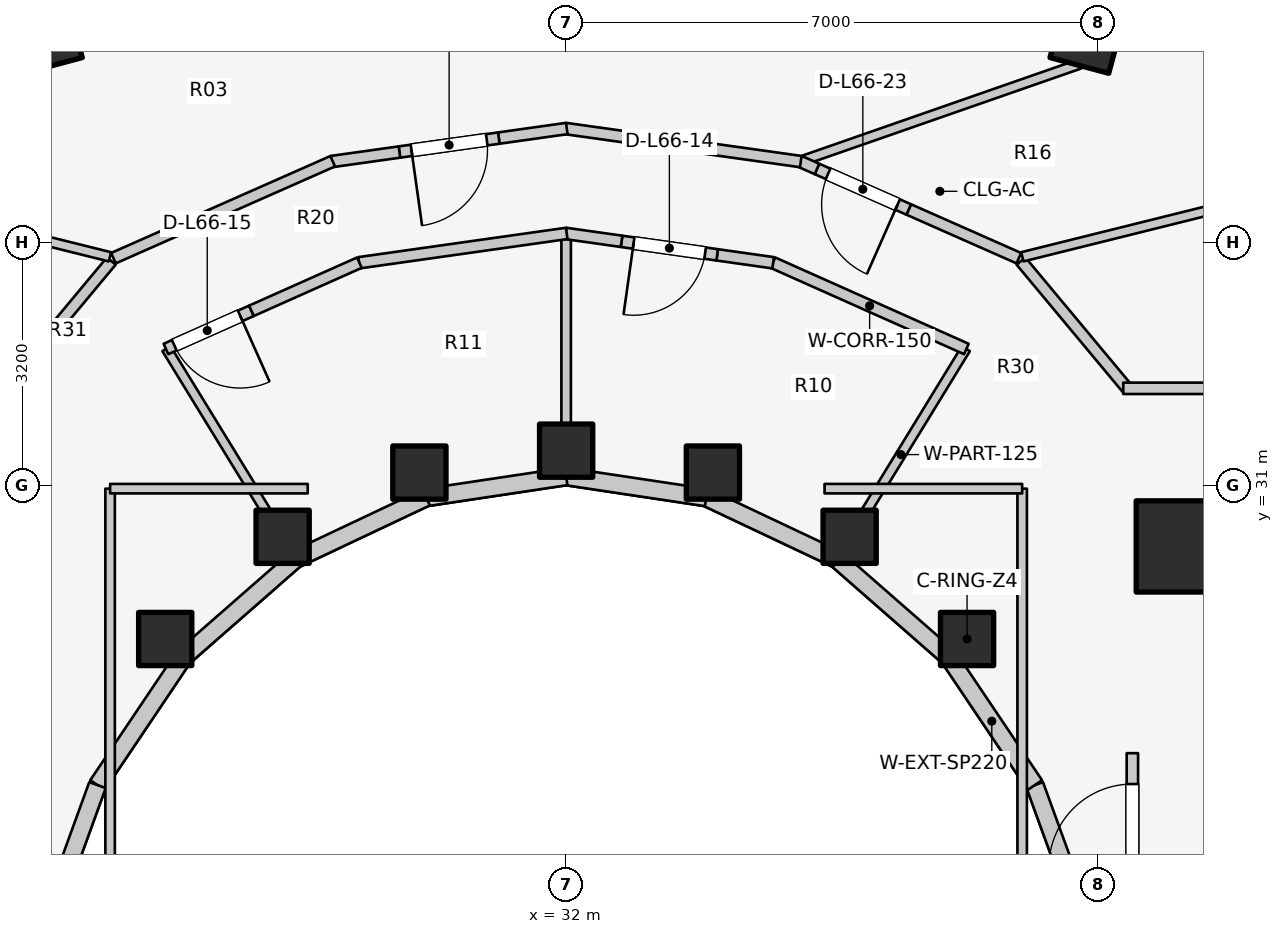
"""IFC4 building model, lengths in metres.
Left out: names, types, materials, properties, quantities, classifications, styles, units other than length and angle.
Written with IfcOpenShell. Run it as: python <this file> out.ifc"""

import sys

from ifc_helpers import new_model, si_unit, direction, frame, frame_2d, origin, origin_2d, place, context, subcontext, project, spatial, rectangle, extrude, element, fill, save


model = new_model("IFC4")
c1 = context("Model", 3, precision=1e-05, world=origin(), true_north=direction((0.0, 1.0)))
c2 = subcontext(c1, "Body", "Model", "MODEL_VIEW")
j1 = project(units=[si_unit("LENGTHUNIT", "METRE"), si_unit("PLANEANGLEUNIT", "RADIAN")], contexts=[c1])
p1 = place(None, origin())
s1 = spatial("IfcSite", under=j1, at=p1, CompositionType="ELEMENT")
p2 = place(p1, origin())
s2 = spatial("IfcBuilding", under=s1, at=p2, CompositionType="ELEMENT")
p3 = place(p2, frame((0.0, 0.0, 217.1)))
s3 = spatial("IfcBuildingStorey", under=s2, at=p3, CompositionType="ELEMENT", Elevation=217.1)
p4 = place(p3, frame((39.85, 30.35, 0.0), z_axis=(0.0, 0.0, 1.0), x_axis=(1.0, 0.0, 0.0)))
e1 = element("IfcWall", 1, at=p4, inside=s3, PredefinedType="SHEAR", context=c2, shape_type="SweptSolid", body=[
    extrude(rectangle(XDim=4.5, YDim=0.55, at=frame_2d((2.25, 0.0))), origin(), (0.0, 0.0, 1.0), 3.1),
])
p5 = place(p3, frame((40.1, 30.2, 0.0), z_axis=(0.0, 0.0, 1.0), x_axis=(1.0, 0.0, 0.0)))
e2 = element("IfcColumn", 2, at=p5, inside=s3, PredefinedType="COLUMN", context=c2, shape_type="SweptSolid", body=[
    extrude(rectangle(XDim=1.2, YDim=1.2, at=origin_2d()), origin(), (0.0, 0.0, 1.0), 3.1),
])
for number, where, z_axis, x_axis in (
    (3, (37.275, 28.982, 0.0), (0.0, 0.0, 1.0), (1.0, 0.0, 0.0)),
    (4, (35.73, 30.327, 0.0), (0.0, 0.0, 1.0), (1.0, 0.0, 0.0)),
    (5, (33.931, 31.172, 0.0), (0.0, 0.0, 1.0), (1.0, 0.0, 0.0)),
):
    element("IfcColumn", number, at=place(p3, frame(where, z_axis=z_axis, x_axis=x_axis)), inside=s3, PredefinedType="COLUMN", context=c2, shape_type="SweptSolid", body=[
        extrude(rectangle(XDim=0.7, YDim=0.7, at=origin_2d()), origin(), (0.0, 0.0, 1.0), 3.1),
    ])
p6 = place(p3, frame((38.856, 36.914, 0.0), z_axis=(0.0, 0.0, 1.0), x_axis=(0.258819045103, 0.965925826289, 0.0)))
e6 = element("IfcColumn", 6, at=p6, inside=s3, PredefinedType="COLUMN", context=c2, shape_type="SweptSolid", body=[
    extrude(rectangle(XDim=0.8, YDim=0.8, at=origin_2d()), origin(), (0.0, 0.0, 1.0), 3.1),
])
for number, where, z_axis, x_axis in (
    (7, (32.0, 31.46, 0.0), (0.0, 0.0, 1.0), (1.0, 0.0, 0.0)),
    (8, (30.069, 31.172, 0.0), (0.0, 0.0, 1.0), (1.0, 0.0, 0.0)),
):
    element("IfcColumn", number, at=place(p3, frame(where, z_axis=z_axis, x_axis=x_axis)), inside=s3, PredefinedType="COLUMN", context=c2, shape_type="SweptSolid", body=[
        extrude(rectangle(XDim=0.7, YDim=0.7, at=origin_2d()), origin(), (0.0, 0.0, 1.0), 3.1),
    ])
p7 = place(p3, frame((25.144, 36.914, 0.0), z_axis=(0.0, 0.0, 1.0), x_axis=(-0.258819045103, 0.965925826289, 0.0)))
e9 = element("IfcColumn", 9, at=p7, inside=s3, PredefinedType="COLUMN", context=c2, shape_type="SweptSolid", body=[
    extrude(rectangle(XDim=0.8, YDim=0.8, at=origin_2d()), origin(), (0.0, 0.0, 1.0), 3.1),
])
for number, where, z_axis, x_axis in (
    (10, (28.27, 30.327, 0.0), (0.0, 0.0, 1.0), (1.0, 0.0, 0.0)),
    (11, (26.725, 28.982, 0.0), (0.0, 0.0, 1.0), (1.0, 0.0, 0.0)),
):
    element("IfcColumn", number, at=place(p3, frame(where, z_axis=z_axis, x_axis=x_axis)), inside=s3, PredefinedType="COLUMN", context=c2, shape_type="SweptSolid", body=[
        extrude(rectangle(XDim=0.7, YDim=0.7, at=origin_2d()), origin(), (0.0, 0.0, 1.0), 3.1),
    ])
p8 = place(p3, frame((38.877, 25.102, 0.0), z_axis=(0.0, 0.0, 1.0), x_axis=(-0.341423187295, 0.93990968033, 0.0)))
e12 = element("IfcWall", 12, at=p8, inside=s3, PredefinedType="STANDARD", context=c2, shape_type="SweptSolid", body=[
    extrude(rectangle(XDim=2.084, YDim=0.23, at=frame_2d((1.042, 0.0))), origin(), (0.0, 0.0, 1.0), 2.56),
])
p9 = place(p3, frame((38.166, 27.06, 0.0), z_axis=(0.0, 0.0, 1.0), x_axis=(-0.558197800898, 0.829707909492, 0.0)))
e13 = element("IfcWall", 13, at=p9, inside=s3, PredefinedType="STANDARD", context=c2, shape_type="SweptSolid", body=[
    extrude(rectangle(XDim=2.027, YDim=0.23, at=frame_2d((1.013, 0.0))), origin(), (0.0, 0.0, 1.0), 1.22),
])
p10 = place(p3, frame((37.035, 28.742, 0.0), z_axis=(0.0, 0.0, 1.0), x_axis=(-0.752576694707, 0.658504607869, 0.0)))
e14 = element("IfcWall", 14, at=p10, inside=s3, PredefinedType="STANDARD", context=c2, shape_type="SweptSolid", body=[
    extrude(rectangle(XDim=1.959, YDim=0.23, at=frame_2d((0.98, 0.0))), origin(), (0.0, 0.0, 1.0), 1.22),
])
p11 = place(p3, frame((35.56, 30.032, 0.0), z_axis=(0.0, 0.0, 1.0), x_axis=(-0.904179699603, 0.427152280606, 0.0)))
e15 = element("IfcWall", 15, at=p11, inside=s3, PredefinedType="STANDARD", context=c2, shape_type="SweptSolid", body=[
    extrude(rectangle(XDim=1.899, YDim=0.23, at=frame_2d((0.95, 0.0))), origin(), (0.0, 0.0, 1.0), 1.22),
])
for number, where, z_axis, x_axis in (
    (16, (33.843, 30.843, 0.0), (0.0, 0.0, 1.0), (-0.989, 0.149, 0.0)),
    (17, (32.0, 31.12, 0.0), (0.0, 0.0, 1.0), (-0.989, -0.149, 0.0)),
):
    element("IfcWall", number, at=place(p3, frame(where, z_axis=z_axis, x_axis=x_axis)), inside=s3, PredefinedType="STANDARD", context=c2, shape_type="SweptSolid", body=[
        extrude(rectangle(XDim=1.864, YDim=0.23, at=frame_2d((0.932, 0.0))), origin(), (0.0, 0.0, 1.0), 1.22),
    ])
p12 = place(p3, frame((30.157, 30.843, 0.0), z_axis=(0.0, 0.0, 1.0), x_axis=(-0.904179699603, -0.427152280606, 0.0)))
e18 = element("IfcWall", 18, at=p12, inside=s3, PredefinedType="STANDARD", context=c2, shape_type="SweptSolid", body=[
    extrude(rectangle(XDim=1.899, YDim=0.23, at=frame_2d((0.95, 0.0))), origin(), (0.0, 0.0, 1.0), 1.22),
])
p13 = place(p3, frame((28.44, 30.032, 0.0), z_axis=(0.0, 0.0, 1.0), x_axis=(-0.752576694707, -0.658504607869, 0.0)))
e19 = element("IfcWall", 19, at=p13, inside=s3, PredefinedType="STANDARD", context=c2, shape_type="SweptSolid", body=[
    extrude(rectangle(XDim=1.959, YDim=0.23, at=frame_2d((0.98, 0.0))), origin(), (0.0, 0.0, 1.0), 1.22),
])
p14 = place(p3, frame((26.965, 28.742, 0.0), z_axis=(0.0, 0.0, 1.0), x_axis=(-0.558197800898, -0.829707909492, 0.0)))
e20 = element("IfcWall", 20, at=p14, inside=s3, PredefinedType="STANDARD", context=c2, shape_type="SweptSolid", body=[
    extrude(rectangle(XDim=2.027, YDim=0.23, at=frame_2d((1.013, 0.0))), origin(), (0.0, 0.0, 1.0), 1.22),
])
p15 = place(p3, frame((25.834, 27.06, 0.0), z_axis=(0.0, 0.0, 1.0), x_axis=(-0.341423187295, -0.93990968033, 0.0)))
e21 = element("IfcWall", 21, at=p15, inside=s3, PredefinedType="STANDARD", context=c2, shape_type="SweptSolid", body=[
    extrude(rectangle(XDim=2.084, YDim=0.23, at=frame_2d((1.042, 0.0))), origin(), (0.0, 0.0, 1.0), 2.56),
])
p16 = place(p3, frame((39.45, 24.08, 0.0), z_axis=(0.0, 0.0, 1.0), x_axis=(0.0, 1.0, 0.0)))
e22 = element("IfcWall", 22, at=p16, inside=s3, PredefinedType="PARTITIONING", context=c2, shape_type="SweptSolid", body=[
    extrude(rectangle(XDim=3.4, YDim=0.15, at=frame_2d((1.7, 0.0))), origin(), (0.0, 0.0, 1.0), 2.575),
])
p17 = place(p16, frame((1.894, 0.0, 0.0)))
e23 = element("IfcOpeningElement", 23, at=p17, cuts=e22, PredefinedType="OPENING", context=c2, shape_type="SweptSolid", body=[
    extrude(rectangle(XDim=1.1, YDim=2.1, at=frame_2d((0.55, 1.05))), frame((0.0, 0.085, 0.0), z_axis=(0.0, -1.0, 0.0), x_axis=(1.0, 0.0, 0.0)), (0.0, 0.0, 1.0), 0.17),
])
p18 = place(p3, frame((35.55, 30.015, 0.0), z_axis=(0.0, 0.0, 1.0), x_axis=(0.522763432117, 0.852477796802, 0.0)))
e24 = element("IfcWall", 24, at=p18, inside=s3, PredefinedType="PARTITIONING", context=c2, shape_type="SweptSolid", body=[
    extrude(rectangle(XDim=3.269, YDim=0.125, at=frame_2d((1.635, 0.0))), origin(), (0.0, 0.0, 1.0), 1.22),
])
p19 = place(p3, frame((32.0, 31.1, 0.0), z_axis=(0.0, 0.0, 1.0), x_axis=(0.0, 1.0, 0.0)))
e25 = element("IfcWall", 25, at=p19, inside=s3, PredefinedType="PARTITIONING", context=c2, shape_type="SweptSolid", body=[
    extrude(rectangle(XDim=3.218, YDim=0.125, at=frame_2d((1.609, 0.0))), origin(), (0.0, 0.0, 1.0), 1.22),
])
p20 = place(p3, frame((28.45, 30.015, 0.0), z_axis=(0.0, 0.0, 1.0), x_axis=(-0.522763432117, 0.852477796802, 0.0)))
e26 = element("IfcWall", 26, at=p20, inside=s3, PredefinedType="PARTITIONING", context=c2, shape_type="SweptSolid", body=[
    extrude(rectangle(XDim=3.269, YDim=0.125, at=frame_2d((1.635, 0.0))), origin(), (0.0, 0.0, 1.0), 1.22),
])
p21 = place(p3, frame((37.265, 32.798, 0.0), z_axis=(0.0, 0.0, 1.0), x_axis=(-0.913254317828, 0.407389924971, 0.0)))
e27 = element("IfcWall", 27, at=p21, inside=s3, PredefinedType="PARTITIONING", context=c2, shape_type="SweptSolid", body=[
    extrude(rectangle(XDim=2.787, YDim=0.15, at=frame_2d((1.393, 0.0))), origin(), (0.0, 0.0, 1.0), 1.22),
])
p22 = place(p3, frame((34.724, 33.932, 0.0), z_axis=(0.0, 0.0, 1.0), x_axis=(-0.990190745647, 0.13972217875, 0.0)))
e28 = element("IfcWall", 28, at=p22, inside=s3, PredefinedType="PARTITIONING", context=c2, shape_type="SweptSolid", body=[
    extrude(rectangle(XDim=0.744, YDim=0.15, at=frame_2d((0.372, 0.0))), origin(), (0.0, 0.0, 1.0), 2.105),
])
p23 = place(p3, frame((33.987, 34.036, 0.0), z_axis=(0.0, 0.0, 1.0), x_axis=(-0.990133183593, 0.140129507055, 0.0)))
e29 = element("IfcWall", 29, at=p23, inside=s3, PredefinedType="PARTITIONING", context=c2, shape_type="SweptSolid", body=[
    extrude(rectangle(XDim=1.27, YDim=0.15, at=frame_2d((0.635, 0.0))), origin(), (0.0, 0.0, 1.0), 2.16),
])
p24 = place(p23, frame((0.16, 0.0, 0.0)))
e30 = element("IfcOpeningElement", 30, at=p24, cuts=e29, PredefinedType="OPENING", context=c2, shape_type="SweptSolid", body=[
    extrude(rectangle(XDim=0.95, YDim=2.1, at=frame_2d((0.475, 1.05))), frame((0.0, 0.085, 0.0), z_axis=(0.0, -1.0, 0.0), x_axis=(1.0, 0.0, 0.0)), (0.0, 0.0, 1.0), 0.17),
])
p25 = place(p3, frame((32.729, 34.214, 0.0), z_axis=(0.0, 0.0, 1.0), x_axis=(-0.990138882688, 0.140089232242, 0.0)))
e31 = element("IfcWall", 31, at=p25, inside=s3, PredefinedType="PARTITIONING", context=c2, shape_type="SweptSolid", body=[
    extrude(rectangle(XDim=0.744, YDim=0.15, at=frame_2d((0.372, 0.0))), origin(), (0.0, 0.0, 1.0), 1.22),
])
p26 = place(p3, frame((32.007, 34.318, 0.0), z_axis=(0.0, 0.0, 1.0), x_axis=(-0.990150268487, -0.140008734782, 0.0)))
e32 = element("IfcWall", 32, at=p26, inside=s3, PredefinedType="PARTITIONING", context=c2, shape_type="SweptSolid", body=[
    extrude(rectangle(XDim=2.759, YDim=0.15, at=frame_2d((1.379, 0.0))), origin(), (0.0, 0.0, 1.0), 1.22),
])
p27 = place(p3, frame((29.28, 33.933, 0.0), z_axis=(0.0, 0.0, 1.0), x_axis=(-0.913286906099, -0.407316863324, 0.0)))
e33 = element("IfcWall", 33, at=p27, inside=s3, PredefinedType="PARTITIONING", context=c2, shape_type="SweptSolid", body=[
    extrude(rectangle(XDim=1.557, YDim=0.15, at=frame_2d((0.778, 0.0))), origin(), (0.0, 0.0, 1.0), 1.22),
])
p28 = place(p3, frame((27.858, 33.299, 0.0), z_axis=(0.0, 0.0, 1.0), x_axis=(-0.91321306925, -0.407482380172, 0.0)))
e34 = element("IfcWall", 34, at=p28, inside=s3, PredefinedType="PARTITIONING", context=c2, shape_type="SweptSolid", body=[
    extrude(rectangle(XDim=1.23, YDim=0.15, at=frame_2d((0.615, 0.0))), origin(), (0.0, 0.0, 1.0), 2.16),
])
p29 = place(p28, frame((0.16, 0.0, 0.0)))
e35 = element("IfcOpeningElement", 35, at=p29, cuts=e34, PredefinedType="OPENING", context=c2, shape_type="SweptSolid", body=[
    extrude(rectangle(XDim=0.95, YDim=2.1, at=frame_2d((0.475, 1.05))), frame((0.0, 0.085, 0.0), z_axis=(0.0, -1.0, 0.0), x_axis=(1.0, 0.0, 0.0)), (0.0, 0.0, 1.0), 0.17),
])
p30 = place(p3, frame((26.0, 25.8, 0.0), z_axis=(0.0, 0.0, 1.0), x_axis=(0.0, 1.0, 0.0)))
e36 = element("IfcWall", 36, at=p30, inside=s3, PredefinedType="PARTITIONING", context=c2, shape_type="SweptSolid", body=[
    extrude(rectangle(XDim=5.16, YDim=0.125, at=frame_2d((2.58, 0.0))), origin(), (0.0, 0.0, 1.0), 1.952),
])
p31 = place(p3, frame((26.0, 30.96, 0.0), z_axis=(0.0, 0.0, 1.0), x_axis=(1.0, 0.0, 0.0)))
e37 = element("IfcWall", 37, at=p31, inside=s3, PredefinedType="PARTITIONING", context=c2, shape_type="SweptSolid", body=[
    extrude(rectangle(XDim=2.6, YDim=0.125, at=frame_2d((1.3, 0.0))), origin(), (0.0, 0.0, 1.0), 1.22),
])
p32 = place(p3, frame((38.0, 25.8, 0.0), z_axis=(0.0, 0.0, 1.0), x_axis=(0.0, 1.0, 0.0)))
e38 = element("IfcWall", 38, at=p32, inside=s3, PredefinedType="PARTITIONING", context=c2, shape_type="SweptSolid", body=[
    extrude(rectangle(XDim=5.16, YDim=0.125, at=frame_2d((2.58, 0.0))), origin(), (0.0, 0.0, 1.0), 1.952),
])
p33 = place(p3, frame((35.4, 30.96, 0.0), z_axis=(0.0, 0.0, 1.0), x_axis=(1.0, 0.0, 0.0)))
e39 = element("IfcWall", 39, at=p33, inside=s3, PredefinedType="PARTITIONING", context=c2, shape_type="SweptSolid", body=[
    extrude(rectangle(XDim=2.6, YDim=0.125, at=frame_2d((1.3, 0.0))), origin(), (0.0, 0.0, 1.0), 1.22),
])
p34 = place(p3, frame((37.984, 33.955, 0.0), z_axis=(0.0, 0.0, 1.0), x_axis=(0.64030392053, -0.76812166312, 0.0)))
e40 = element("IfcWall", 40, at=p34, inside=s3, PredefinedType="PARTITIONING", context=c2, shape_type="SweptSolid", body=[
    extrude(rectangle(XDim=2.21, YDim=0.15, at=frame_2d((1.105, 0.0))), origin(), (0.0, 0.0, 1.0), 1.22),
])
p35 = place(p3, frame((39.33, 32.28, 0.0), z_axis=(0.0, 0.0, 1.0), x_axis=(1.0, 0.0, 0.0)))
e41 = element("IfcWall", 41, at=p35, inside=s3, PredefinedType="PARTITIONING", context=c2, shape_type="SweptSolid", body=[
    extrude(rectangle(XDim=5.572, YDim=0.15, at=frame_2d((2.786, 0.0))), origin(), (0.0, 0.0, 1.0), 1.22),
])
p36 = place(p3, frame((26.016, 33.955, 0.0), z_axis=(0.0, 0.0, 1.0), x_axis=(-0.64030392053, -0.76812166312, 0.0)))
e42 = element("IfcWall", 42, at=p36, inside=s3, PredefinedType="PARTITIONING", context=c2, shape_type="SweptSolid", body=[
    extrude(rectangle(XDim=2.21, YDim=0.15, at=frame_2d((1.105, 0.0))), origin(), (0.0, 0.0, 1.0), 1.22),
])
p37 = place(p3, frame((38.002, 34.01, 0.0), z_axis=(0.0, 0.0, 1.0), x_axis=(0.970445810114, 0.241319144769, 0.0)))
e43 = element("IfcWall", 43, at=p37, inside=s3, PredefinedType="PARTITIONING", context=c2, shape_type="SweptSolid", body=[
    extrude(rectangle(XDim=5.526, YDim=0.125, at=frame_2d((2.763, 0.0))), origin(), (0.0, 0.0, 1.0), 1.22),
])
p38 = place(p3, frame((35.131, 35.283, 0.0), z_axis=(0.0, 0.0, 1.0), x_axis=(0.944311395416, 0.329053169697, 0.0)))
e44 = element("IfcWall", 44, at=p38, inside=s3, PredefinedType="PARTITIONING", context=c2, shape_type="SweptSolid", body=[
    extrude(rectangle(XDim=3.84, YDim=0.125, at=frame_2d((1.92, 0.0))), origin(), (0.0, 0.0, 1.0), 1.22),
])
p39 = place(p3, frame((25.998, 34.01, 0.0), z_axis=(0.0, 0.0, 1.0), x_axis=(-0.970445810114, 0.241319144769, 0.0)))
e45 = element("IfcWall", 45, at=p39, inside=s3, PredefinedType="PARTITIONING", context=c2, shape_type="SweptSolid", body=[
    extrude(rectangle(XDim=5.526, YDim=0.125, at=frame_2d((2.763, 0.0))), origin(), (0.0, 0.0, 1.0), 1.22),
])
p40 = place(p3, frame((37.956, 33.992, 0.0), z_axis=(0.0, 0.0, 1.0), x_axis=(-0.914654802586, 0.404235812499, 0.0)))
e46 = element("IfcWall", 46, at=p40, inside=s3, PredefinedType="PARTITIONING", context=c2, shape_type="SweptSolid", body=[
    extrude(rectangle(XDim=1.584, YDim=0.15, at=frame_2d((0.792, 0.0))), origin(), (0.0, 0.0, 1.0), 1.22),
])
p41 = place(p3, frame((36.507, 34.633, 0.0), z_axis=(0.0, 0.0, 1.0), x_axis=(-0.914618215061, 0.404318588094, 0.0)))
e47 = element("IfcWall", 47, at=p41, inside=s3, PredefinedType="PARTITIONING", context=c2, shape_type="SweptSolid", body=[
    extrude(rectangle(XDim=1.32, YDim=0.15, at=frame_2d((0.66, 0.0))), origin(), (0.0, 0.0, 1.0), 2.16),
])
p42 = place(p41, frame((0.16, 0.0, 0.0)))
e48 = element("IfcOpeningElement", 48, at=p42, cuts=e47, PredefinedType="OPENING", context=c2, shape_type="SweptSolid", body=[
    extrude(rectangle(XDim=1.0, YDim=2.1, at=frame_2d((0.5, 1.05))), frame((0.0, 0.085, 0.0), z_axis=(0.0, -1.0, 0.0), x_axis=(1.0, 0.0, 0.0)), (0.0, 0.0, 1.0), 0.17),
])
p43 = place(p3, frame((35.3, 35.167, 0.0), z_axis=(0.0, 0.0, 1.0), x_axis=(-0.914694996527, 0.404144854389, 0.0)))
e49 = element("IfcWall", 49, at=p43, inside=s3, PredefinedType="PARTITIONING", context=c2, shape_type="SweptSolid", body=[
    extrude(rectangle(XDim=0.25, YDim=0.15, at=frame_2d((0.125, 0.0))), origin(), (0.0, 0.0, 1.0), 2.575),
])
p44 = place(p3, frame((35.087, 35.263, 0.0), z_axis=(0.0, 0.0, 1.0), x_axis=(-0.990268690673, 0.139168675614, 0.0)))
e50 = element("IfcWall", 50, at=p44, inside=s3, PredefinedType="PARTITIONING", context=c2, shape_type="SweptSolid", body=[
    extrude(rectangle(XDim=3.126, YDim=0.15, at=frame_2d((1.563, 0.0))), origin(), (0.0, 0.0, 1.0), 1.22),
])
p45 = place(p3, frame((32.008, 35.698, 0.0), z_axis=(0.0, 0.0, 1.0), x_axis=(-0.990260655864, -0.139225836137, 0.0)))
e51 = element("IfcWall", 51, at=p45, inside=s3, PredefinedType="PARTITIONING", context=c2, shape_type="SweptSolid", body=[
    extrude(rectangle(XDim=0.903, YDim=0.15, at=frame_2d((0.452, 0.0))), origin(), (0.0, 0.0, 1.0), 1.22),
])
p46 = place(p3, frame((31.114, 35.572, 0.0), z_axis=(0.0, 0.0, 1.0), x_axis=(-0.990279679751, -0.139090459315, 0.0)))
e52 = element("IfcWall", 52, at=p46, inside=s3, PredefinedType="PARTITIONING", context=c2, shape_type="SweptSolid", body=[
    extrude(rectangle(XDim=1.32, YDim=0.15, at=frame_2d((0.66, 0.0))), origin(), (0.0, 0.0, 1.0), 2.575),
])
p47 = place(p46, frame((0.16, 0.0, 0.0)))
e53 = element("IfcOpeningElement", 53, at=p47, cuts=e52, PredefinedType="OPENING", context=c2, shape_type="SweptSolid", body=[
    extrude(rectangle(XDim=1.0, YDim=2.1, at=frame_2d((0.5, 1.05))), frame((0.0, 0.085, 0.0), z_axis=(0.0, -1.0, 0.0), x_axis=(1.0, 0.0, 0.0)), (0.0, 0.0, 1.0), 0.17),
])
p48 = place(p3, frame((29.807, 35.389, 0.0), z_axis=(0.0, 0.0, 1.0), x_axis=(-0.990260655864, -0.139225836137, 0.0)))
e54 = element("IfcWall", 54, at=p48, inside=s3, PredefinedType="PARTITIONING", context=c2, shape_type="SweptSolid", body=[
    extrude(rectangle(XDim=0.903, YDim=0.15, at=frame_2d((0.452, 0.0))), origin(), (0.0, 0.0, 1.0), 2.575),
])
p49 = place(p3, frame((28.929, 35.268, 0.0), z_axis=(0.0, 0.0, 1.0), x_axis=(-0.914642679993, -0.404263240891, 0.0)))
e55 = element("IfcWall", 55, at=p49, inside=s3, PredefinedType="PARTITIONING", context=c2, shape_type="SweptSolid", body=[
    extrude(rectangle(XDim=3.154, YDim=0.15, at=frame_2d((1.577, 0.0))), origin(), (0.0, 0.0, 1.0), 1.22),
])
p50 = place(p17, origin())
e56 = element("IfcDoor", 56, at=p50, inside=s3, OperationType="SINGLE_SWING_LEFT", PredefinedType="DOOR", context=c2, shape_type="SweptSolid", body=[
    extrude(rectangle(XDim=1.1, YDim=2.1, at=frame_2d((0.55, 1.05))), frame((0.0, 0.025, 0.0), z_axis=(0.0, -1.0, 0.0), x_axis=(1.0, 0.0, 0.0)), (0.0, 0.0, 1.0), 0.05),
])
fill(e23, e56)
p51 = place(p24, origin())
e57 = element("IfcDoor", 57, at=p51, inside=s3, OperationType="SINGLE_SWING_RIGHT", PredefinedType="DOOR", context=c2, shape_type="SweptSolid", body=[
    extrude(rectangle(XDim=0.95, YDim=2.1, at=frame_2d((0.475, 1.05))), frame((0.0, 0.025, 0.0), z_axis=(0.0, -1.0, 0.0), x_axis=(1.0, 0.0, 0.0)), (0.0, 0.0, 1.0), 0.05),
])
fill(e30, e57)
p52 = place(p29, origin())
e58 = element("IfcDoor", 58, at=p52, inside=s3, OperationType="SINGLE_SWING_LEFT", PredefinedType="DOOR", context=c2, shape_type="SweptSolid", body=[
    extrude(rectangle(XDim=0.95, YDim=2.1, at=frame_2d((0.475, 1.05))), frame((0.0, 0.025, 0.0), z_axis=(0.0, -1.0, 0.0), x_axis=(1.0, 0.0, 0.0)), (0.0, 0.0, 1.0), 0.05),
])
fill(e35, e58)
p53 = place(p42, origin())
e59 = element("IfcDoor", 59, at=p53, inside=s3, OperationType="SINGLE_SWING_LEFT", PredefinedType="DOOR", context=c2, shape_type="SweptSolid", body=[
    extrude(rectangle(XDim=1.0, YDim=2.1, at=frame_2d((0.5, 1.05))), frame((0.0, 0.025, 0.0), z_axis=(0.0, -1.0, 0.0), x_axis=(1.0, 0.0, 0.0)), (0.0, 0.0, 1.0), 0.05),
])
fill(e48, e59)
p54 = place(p47, origin())
e60 = element("IfcDoor", 60, at=p54, inside=s3, OperationType="SINGLE_SWING_RIGHT", PredefinedType="DOOR", context=c2, shape_type="SweptSolid", body=[
    extrude(rectangle(XDim=1.0, YDim=2.1, at=frame_2d((0.5, 1.05))), frame((0.0, 0.025, 0.0), z_axis=(0.0, -1.0, 0.0), x_axis=(1.0, 0.0, 0.0)), (0.0, 0.0, 1.0), 0.05),
])
fill(e53, e60)
save(model, sys.argv[1])
